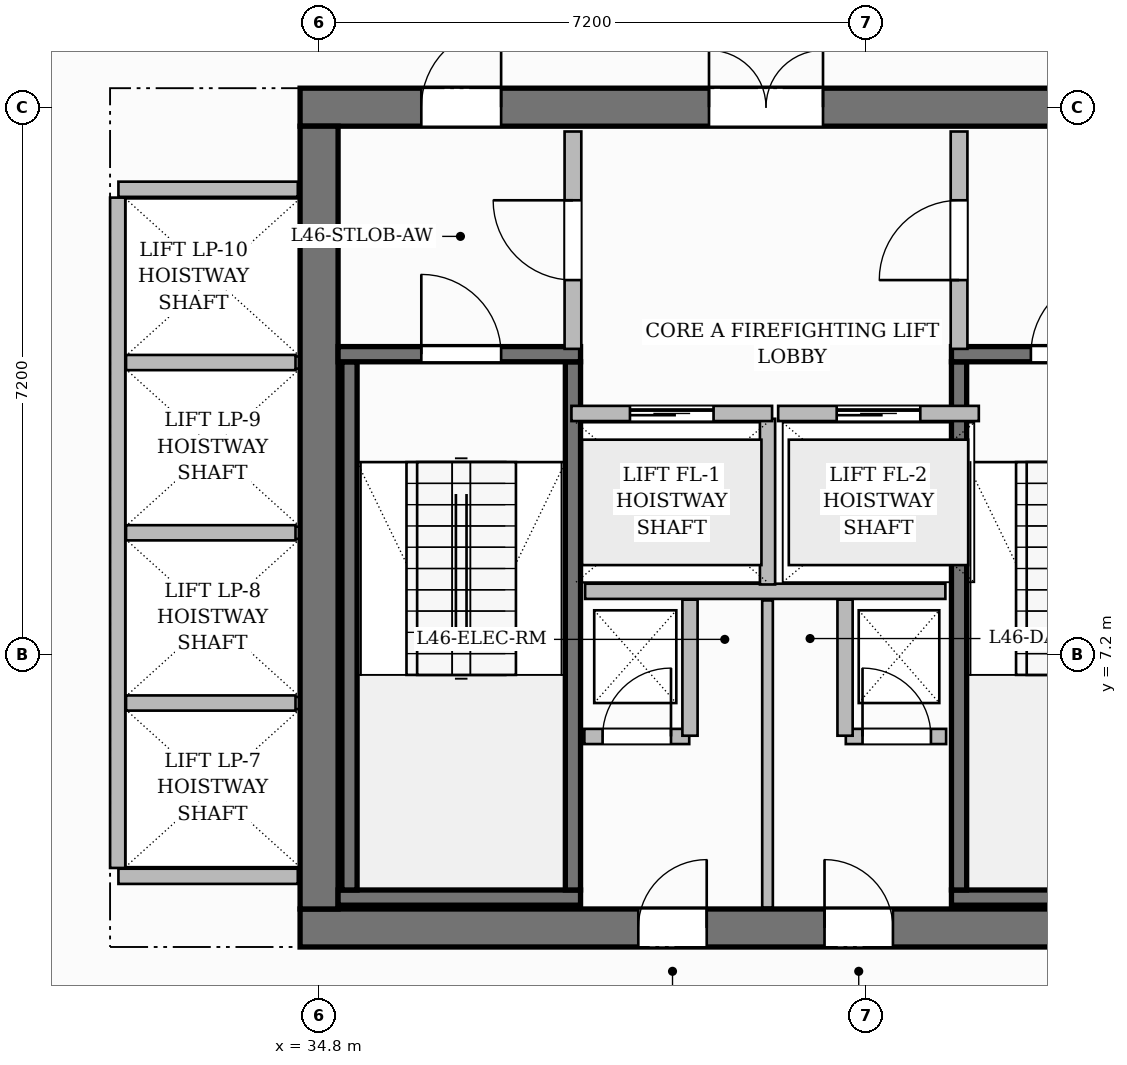
"""IFC4 building model, lengths in metres.
Left out: names, types, materials, properties, quantities, classifications, styles, units other than length and angle.
Written with IfcOpenShell. Run it as: python <this file> out.ifc"""

import sys

from ifc_helpers import new_model, si_unit, direction, frame, frame_2d, origin, place, context, subcontext, project, spatial, rectangle, extrude, source, transform, mapped, element, fill, save


model = new_model("IFC4")
c1 = context("Model", 3, precision=1e-05, world=origin(), true_north=direction((0.0, 1.0)))
c2 = subcontext(c1, "Body", "Model", "MODEL_VIEW")
j1 = project(units=[si_unit("LENGTHUNIT", "METRE"), si_unit("PLANEANGLEUNIT", "RADIAN")], contexts=[c1])
p1 = place(None, origin())
s1 = spatial("IfcSite", under=j1, at=p1, CompositionType="ELEMENT")
p2 = place(p1, origin())
s2 = spatial("IfcBuilding", under=s1, at=p2, CompositionType="ELEMENT")
p3 = place(p2, frame((0.0, 0.0, 184.95)))
s3 = spatial("IfcBuildingStorey", under=s2, at=p3, CompositionType="ELEMENT", Elevation=184.95)
p4 = place(p3, frame((34.55, 3.6, 0.0), z_axis=(0.0, 0.0, 1.0), x_axis=(1.0, 0.0, 0.0)))
e1 = element("IfcWall", 1, at=p4, inside=s3, PredefinedType="SHEAR", context=c2, shape_type="SweptSolid", body=[
    extrude(rectangle(XDim=15.5, YDim=0.5, at=frame_2d((7.75, 0.0))), origin(), (0.0, 0.0, 1.0), 3.85),
])
p5 = place(p4, frame((4.45, 0.0, 0.0)))
e2 = element("IfcOpeningElement", 2, at=p5, cuts=e1, PredefinedType="OPENING", context=c2, shape_type="SweptSolid", body=[
    extrude(rectangle(XDim=0.9, YDim=2.1, at=frame_2d((0.45, 1.05))), frame((0.0, 0.26, 0.0), z_axis=(0.0, -1.0, 0.0), x_axis=(1.0, 0.0, 0.0)), (0.0, 0.0, 1.0), 0.52),
])
p6 = place(p4, frame((6.9, 0.0, 0.0)))
e3 = element("IfcOpeningElement", 3, at=p6, cuts=e1, PredefinedType="OPENING", context=c2, shape_type="SweptSolid", body=[
    extrude(rectangle(XDim=0.9, YDim=2.1, at=frame_2d((0.45, 1.05))), frame((0.0, 0.26, 0.0), z_axis=(0.0, -1.0, 0.0), x_axis=(1.0, 0.0, 0.0)), (0.0, 0.0, 1.0), 0.52),
])
p7 = place(p3, frame((34.55, 14.4, 0.0), z_axis=(0.0, 0.0, 1.0), x_axis=(1.0, 0.0, 0.0)))
e4 = element("IfcWall", 4, at=p7, inside=s3, PredefinedType="SHEAR", context=c2, shape_type="SweptSolid", body=[
    extrude(rectangle(XDim=15.5, YDim=0.5, at=frame_2d((7.75, 0.0))), origin(), (0.0, 0.0, 1.0), 3.85),
])
p8 = place(p7, frame((5.38, 0.0, 0.0)))
e5 = element("IfcOpeningElement", 5, at=p8, cuts=e4, PredefinedType="OPENING", context=c2, shape_type="SweptSolid", body=[
    extrude(rectangle(XDim=1.5, YDim=2.2, at=frame_2d((0.75, 1.1))), frame((0.0, 0.26, 0.0), z_axis=(0.0, -1.0, 0.0), x_axis=(1.0, 0.0, 0.0)), (0.0, 0.0, 1.0), 0.52),
])
p9 = place(p7, frame((1.595, 0.0, 0.0)))
e6 = element("IfcOpeningElement", 6, at=p9, cuts=e4, PredefinedType="OPENING", context=c2, shape_type="SweptSolid", body=[
    extrude(rectangle(XDim=1.05, YDim=2.15, at=frame_2d((0.525, 1.075))), frame((0.0, 0.26, 0.0), z_axis=(0.0, -1.0, 0.0), x_axis=(1.0, 0.0, 0.0)), (0.0, 0.0, 1.0), 0.52),
])
p10 = place(p7, frame((11.225, 0.0, 0.0)))
e7 = element("IfcOpeningElement", 7, at=p10, cuts=e4, PredefinedType="OPENING", context=c2, shape_type="SweptSolid", body=[
    extrude(rectangle(XDim=1.05, YDim=2.15, at=frame_2d((0.525, 1.075))), frame((0.0, 0.26, 0.0), z_axis=(0.0, -1.0, 0.0), x_axis=(1.0, 0.0, 0.0)), (0.0, 0.0, 1.0), 0.52),
])
p11 = place(p3, frame((34.8, 3.85, 0.0), z_axis=(0.0, 0.0, 1.0), x_axis=(0.0, 1.0, 0.0)))
e8 = element("IfcWall", 8, at=p11, inside=s3, PredefinedType="SHEAR", context=c2, shape_type="SweptSolid", body=[
    extrude(rectangle(XDim=10.3, YDim=0.5, at=frame_2d((5.15, 0.0))), origin(), (0.0, 0.0, 1.0), 3.85),
])
p12 = place(p3, frame((35.05, 4.0, 0.0), z_axis=(0.0, 0.0, 1.0), x_axis=(1.0, 0.0, 0.0)))
e9 = element("IfcWall", 9, at=p12, inside=s3, PredefinedType="SHEAR", context=c2, shape_type="SweptSolid", body=[
    extrude(rectangle(XDim=3.19, YDim=0.2, at=frame_2d((1.595, 0.0))), origin(), (0.0, 0.0, 1.0), 3.85),
])
for number, where, z_axis, x_axis in (
    (10, (35.2, 4.1, 0.0), (0.0, 0.0, 1.0), (0.0, 1.0, 0.0)),
    (11, (38.14, 4.1, 0.0), (0.0, 0.0, 1.0), (0.0, 1.0, 0.0)),
):
    element("IfcWall", number, at=place(p3, frame(where, z_axis=z_axis, x_axis=x_axis)), inside=s3, PredefinedType="SHEAR", context=c2, shape_type="SweptSolid", body=[
        extrude(rectangle(XDim=6.95, YDim=0.2, at=frame_2d((3.475, 0.0))), origin(), (0.0, 0.0, 1.0), 3.85),
    ])
p13 = place(p3, frame((35.05, 11.15, 0.0), z_axis=(0.0, 0.0, 1.0), x_axis=(1.0, 0.0, 0.0)))
e12 = element("IfcWall", 12, at=p13, inside=s3, PredefinedType="SHEAR", context=c2, shape_type="SweptSolid", body=[
    extrude(rectangle(XDim=3.19, YDim=0.2, at=frame_2d((1.595, 0.0))), origin(), (0.0, 0.0, 1.0), 3.85),
])
p14 = place(p13, frame((1.095, 0.0, 0.0)))
e13 = element("IfcOpeningElement", 13, at=p14, cuts=e12, PredefinedType="OPENING", context=c2, shape_type="SweptSolid", body=[
    extrude(rectangle(XDim=1.05, YDim=2.2, at=frame_2d((0.525, 1.1))), frame((0.0, 0.11, 0.0), z_axis=(0.0, -1.0, 0.0), x_axis=(1.0, 0.0, 0.0)), (0.0, 0.0, 1.0), 0.22),
])
p15 = place(p3, frame((43.12, 4.0, 0.0), z_axis=(0.0, 0.0, 1.0), x_axis=(1.0, 0.0, 0.0)))
e14 = element("IfcWall", 14, at=p15, inside=s3, PredefinedType="SHEAR", context=c2, shape_type="SweptSolid", body=[
    extrude(rectangle(XDim=6.43, YDim=0.2, at=frame_2d((3.215, 0.0))), origin(), (0.0, 0.0, 1.0), 3.85),
])
p16 = place(p3, frame((43.22, 4.1, 0.0), z_axis=(0.0, 0.0, 1.0), x_axis=(0.0, 1.0, 0.0)))
e15 = element("IfcWall", 15, at=p16, inside=s3, PredefinedType="SHEAR", context=c2, shape_type="SweptSolid", body=[
    extrude(rectangle(XDim=6.95, YDim=0.2, at=frame_2d((3.475, 0.0))), origin(), (0.0, 0.0, 1.0), 3.85),
])
p17 = place(p3, frame((43.12, 11.15, 0.0), z_axis=(0.0, 0.0, 1.0), x_axis=(1.0, 0.0, 0.0)))
e16 = element("IfcWall", 16, at=p17, inside=s3, PredefinedType="SHEAR", context=c2, shape_type="SweptSolid", body=[
    extrude(rectangle(XDim=6.43, YDim=0.2, at=frame_2d((3.215, 0.0))), origin(), (0.0, 0.0, 1.0), 3.85),
])
p18 = place(p17, frame((1.045, 0.0, 0.0)))
e17 = element("IfcOpeningElement", 17, at=p18, cuts=e16, PredefinedType="OPENING", context=c2, shape_type="SweptSolid", body=[
    extrude(rectangle(XDim=1.05, YDim=2.2, at=frame_2d((0.525, 1.1))), frame((0.0, 0.11, 0.0), z_axis=(0.0, -1.0, 0.0), x_axis=(1.0, 0.0, 0.0)), (0.0, 0.0, 1.0), 0.22),
])
p19 = place(p17, frame((4.125, 0.0, 0.0)))
e18 = element("IfcOpeningElement", 18, at=p19, cuts=e16, PredefinedType="OPENING", context=c2, shape_type="SweptSolid", body=[
    extrude(rectangle(XDim=1.05, YDim=2.2, at=frame_2d((0.525, 1.1))), frame((0.0, 0.11, 0.0), z_axis=(0.0, -1.0, 0.0), x_axis=(1.0, 0.0, 0.0)), (0.0, 0.0, 1.0), 0.22),
])
p20 = place(p3, frame((38.3, 8.03, 0.0), z_axis=(0.0, 0.0, 1.0), x_axis=(1.0, 0.0, 0.0)))
e19 = element("IfcWall", 19, at=p20, inside=s3, PredefinedType="PARTITIONING", context=c2, shape_type="SweptSolid", body=[
    extrude(rectangle(XDim=4.74, YDim=0.2, at=frame_2d((2.37, 0.0))), origin(), (0.0, 0.0, 1.0), 3.6),
])
p21 = place(p3, frame((40.7, 8.12, 0.0), z_axis=(0.0, 0.0, 1.0), x_axis=(0.0, 1.0, 0.0)))
e20 = element("IfcWall", 20, at=p21, inside=s3, PredefinedType="PARTITIONING", context=c2, shape_type="SweptSolid", body=[
    extrude(rectangle(XDim=2.18, YDim=0.2, at=frame_2d((1.09, 0.0))), origin(), (0.0, 0.0, 1.0), 3.6),
])
p22 = place(p3, frame((38.14, 11.22, 0.0), z_axis=(0.0, 0.0, 1.0), x_axis=(0.0, 1.0, 0.0)))
e21 = element("IfcWall", 21, at=p22, inside=s3, PredefinedType="PARTITIONING", context=c2, shape_type="SweptSolid", body=[
    extrude(rectangle(XDim=2.86, YDim=0.22, at=frame_2d((1.43, 0.0))), origin(), (0.0, 0.0, 1.0), 3.6),
])
p23 = place(p22, frame((0.905, 0.0, 0.0)))
e22 = element("IfcOpeningElement", 22, at=p23, cuts=e21, PredefinedType="OPENING", context=c2, shape_type="SweptSolid", body=[
    extrude(rectangle(XDim=1.05, YDim=2.15, at=frame_2d((0.525, 1.075))), frame((0.0, 0.12, 0.0), z_axis=(0.0, -1.0, 0.0), x_axis=(1.0, 0.0, 0.0)), (0.0, 0.0, 1.0), 0.24),
])
p24 = place(p3, frame((43.22, 11.22, 0.0), z_axis=(0.0, 0.0, 1.0), x_axis=(0.0, 1.0, 0.0)))
e23 = element("IfcWall", 23, at=p24, inside=s3, PredefinedType="PARTITIONING", context=c2, shape_type="SweptSolid", body=[
    extrude(rectangle(XDim=2.86, YDim=0.22, at=frame_2d((1.43, 0.0))), origin(), (0.0, 0.0, 1.0), 3.6),
])
p25 = place(p24, frame((0.905, 0.0, 0.0)))
e24 = element("IfcOpeningElement", 24, at=p25, cuts=e23, PredefinedType="OPENING", context=c2, shape_type="SweptSolid", body=[
    extrude(rectangle(XDim=1.05, YDim=2.15, at=frame_2d((0.525, 1.075))), frame((0.0, 0.12, 0.0), z_axis=(0.0, -1.0, 0.0), x_axis=(1.0, 0.0, 0.0)), (0.0, 0.0, 1.0), 0.24),
])
p26 = place(p3, frame((38.29, 6.12, 0.0), z_axis=(0.0, 0.0, 1.0), x_axis=(1.0, 0.0, 0.0)))
e25 = element("IfcWall", 25, at=p26, inside=s3, PredefinedType="PARTITIONING", context=c2, shape_type="SweptSolid", body=[
    extrude(rectangle(XDim=1.38, YDim=0.2, at=frame_2d((0.69, 0.0))), origin(), (0.0, 0.0, 1.0), 3.6),
])
p27 = place(p26, frame((0.24, 0.0, 0.0)))
e26 = element("IfcOpeningElement", 26, at=p27, cuts=e25, PredefinedType="OPENING", context=c2, shape_type="SweptSolid", body=[
    extrude(rectangle(XDim=0.9, YDim=2.1, at=frame_2d((0.45, 1.05))), frame((0.0, 0.11, 0.0), z_axis=(0.0, -1.0, 0.0), x_axis=(1.0, 0.0, 0.0)), (0.0, 0.0, 1.0), 0.22),
])
p28 = place(p3, frame((39.68, 6.13, 0.0), z_axis=(0.0, 0.0, 1.0), x_axis=(0.0, 1.0, 0.0)))
e27 = element("IfcWall", 27, at=p28, inside=s3, PredefinedType="PARTITIONING", context=c2, shape_type="SweptSolid", body=[
    extrude(rectangle(XDim=1.79, YDim=0.2, at=frame_2d((0.895, 0.0))), origin(), (0.0, 0.0, 1.0), 3.6),
])
p29 = place(p3, frame((41.73, 6.12, 0.0), z_axis=(0.0, 0.0, 1.0), x_axis=(1.0, 0.0, 0.0)))
e28 = element("IfcWall", 28, at=p29, inside=s3, PredefinedType="PARTITIONING", context=c2, shape_type="SweptSolid", body=[
    extrude(rectangle(XDim=1.32, YDim=0.2, at=frame_2d((0.66, 0.0))), origin(), (0.0, 0.0, 1.0), 3.6),
])
p30 = place(p29, frame((0.22, 0.0, 0.0)))
e29 = element("IfcOpeningElement", 29, at=p30, cuts=e28, PredefinedType="OPENING", context=c2, shape_type="SweptSolid", body=[
    extrude(rectangle(XDim=0.9, YDim=2.1, at=frame_2d((0.45, 1.05))), frame((0.0, 0.11, 0.0), z_axis=(0.0, -1.0, 0.0), x_axis=(1.0, 0.0, 0.0)), (0.0, 0.0, 1.0), 0.22),
])
p31 = place(p3, frame((41.72, 6.13, 0.0), z_axis=(0.0, 0.0, 1.0), x_axis=(0.0, 1.0, 0.0)))
e30 = element("IfcWall", 30, at=p31, inside=s3, PredefinedType="PARTITIONING", context=c2, shape_type="SweptSolid", body=[
    extrude(rectangle(XDim=1.79, YDim=0.2, at=frame_2d((0.895, 0.0))), origin(), (0.0, 0.0, 1.0), 3.6),
])
p32 = place(p3, frame((40.7, 3.87, 0.0), z_axis=(0.0, 0.0, 1.0), x_axis=(0.0, 1.0, 0.0)))
e31 = element("IfcWall", 31, at=p32, inside=s3, PredefinedType="PARTITIONING", context=c2, shape_type="SweptSolid", body=[
    extrude(rectangle(XDim=4.04, YDim=0.14, at=frame_2d((2.02, 0.0))), origin(), (0.0, 0.0, 1.0), 3.6),
])
for number, where, z_axis, x_axis in (
    (32, (32.16, 4.28, 0.0), (0.0, 0.0, 1.0), (1.0, 0.0, 0.0)),
    (33, (32.16, 13.32, 0.0), (0.0, 0.0, 1.0), (1.0, 0.0, 0.0)),
):
    element("IfcWall", number, at=place(p3, frame(where, z_axis=z_axis, x_axis=x_axis)), inside=s3, PredefinedType="PARTITIONING", context=c2, shape_type="SweptSolid", body=[
        extrude(rectangle(XDim=2.36, YDim=0.2, at=frame_2d((1.18, 0.0))), origin(), (0.0, 0.0, 1.0), 3.6),
    ])
p33 = place(p3, frame((32.15, 4.39, 0.0), z_axis=(0.0, 0.0, 1.0), x_axis=(0.0, 1.0, 0.0)))
e34 = element("IfcWall", 34, at=p33, inside=s3, PredefinedType="PARTITIONING", context=c2, shape_type="SweptSolid", body=[
    extrude(rectangle(XDim=8.82, YDim=0.2, at=frame_2d((4.41, 0.0))), origin(), (0.0, 0.0, 1.0), 3.6),
])
for number, where, z_axis, x_axis in (
    (35, (32.26, 6.56, 0.0), (0.0, 0.0, 1.0), (1.0, 0.0, 0.0)),
    (36, (32.26, 8.8, 0.0), (0.0, 0.0, 1.0), (1.0, 0.0, 0.0)),
    (37, (32.26, 11.04, 0.0), (0.0, 0.0, 1.0), (1.0, 0.0, 0.0)),
):
    element("IfcWall", number, at=place(p3, frame(where, z_axis=z_axis, x_axis=x_axis)), inside=s3, PredefinedType="PARTITIONING", context=c2, shape_type="SweptSolid", body=[
        extrude(rectangle(XDim=2.23, YDim=0.2, at=frame_2d((1.115, 0.0))), origin(), (0.0, 0.0, 1.0), 3.6),
    ])
p34 = place(p3, frame((38.12, 10.37, 0.0), z_axis=(0.0, 0.0, 1.0), x_axis=(1.0, 0.0, 0.0)))
e38 = element("IfcWall", 38, at=p34, inside=s3, PredefinedType="PARTITIONING", context=c2, shape_type="SweptSolid", body=[
    extrude(rectangle(XDim=2.64, YDim=0.2, at=frame_2d((1.32, 0.0))), origin(), (0.0, 0.0, 1.0), 3.6),
])
p35 = place(p34, frame((0.77, 0.0, 0.0)))
e39 = element("IfcOpeningElement", 39, at=p35, cuts=e38, PredefinedType="OPENING", context=c2, shape_type="SweptSolid", body=[
    extrude(rectangle(XDim=1.1, YDim=2.2, at=frame_2d((0.55, 1.1))), frame((0.0, 0.11, 0.0), z_axis=(0.0, -1.0, 0.0), x_axis=(1.0, 0.0, 0.0)), (0.0, 0.0, 1.0), 0.22),
])
p36 = place(p3, frame((40.84, 10.37, 0.0), z_axis=(0.0, 0.0, 1.0), x_axis=(1.0, 0.0, 0.0)))
e40 = element("IfcWall", 40, at=p36, inside=s3, PredefinedType="PARTITIONING", context=c2, shape_type="SweptSolid", body=[
    extrude(rectangle(XDim=2.64, YDim=0.2, at=frame_2d((1.32, 0.0))), origin(), (0.0, 0.0, 1.0), 3.6),
])
p37 = place(p36, frame((0.77, 0.0, 0.0)))
e41 = element("IfcOpeningElement", 41, at=p37, cuts=e40, PredefinedType="OPENING", context=c2, shape_type="SweptSolid", body=[
    extrude(rectangle(XDim=1.1, YDim=2.2, at=frame_2d((0.55, 1.1))), frame((0.0, 0.11, 0.0), z_axis=(0.0, -1.0, 0.0), x_axis=(1.0, 0.0, 0.0)), (0.0, 0.0, 1.0), 0.22),
])
m1 = source(origin(), c2, "Body", "SweptSolid", [
    extrude(rectangle(XDim=1.05, YDim=2.2, at=frame_2d((0.525, 1.1))), frame((0.0, 0.025, 0.0), z_axis=(0.0, -1.0, 0.0), x_axis=(1.0, 0.0, 0.0)), (0.0, 0.0, 1.0), 0.05),
])
p38 = place(p14, origin())
e42 = element("IfcDoor", 42, at=p38, inside=s3, OperationType="SINGLE_SWING_LEFT", PredefinedType="DOOR", context=c2, shape_type="MappedRepresentation", body=[
    mapped(m1, transform((0.0, 0.0, 0.0), scale=1.0)),
])
fill(e13, e42)
p39 = place(p18, origin())
e43 = element("IfcDoor", 43, at=p39, inside=s3, OperationType="SINGLE_SWING_RIGHT", PredefinedType="DOOR", context=c2, shape_type="MappedRepresentation", body=[
    mapped(m1, transform((0.0, 0.0, 0.0), scale=1.0)),
])
fill(e17, e43)
m2 = source(origin(), c2, "Body", "SweptSolid", [
    extrude(rectangle(XDim=1.05, YDim=2.15, at=frame_2d((0.525, 1.075))), frame((0.0, 0.025, 0.0), z_axis=(0.0, -1.0, 0.0), x_axis=(1.0, 0.0, 0.0)), (0.0, 0.0, 1.0), 0.05),
])
p40 = place(p23, origin())
e44 = element("IfcDoor", 44, at=p40, inside=s3, OperationType="SINGLE_SWING_RIGHT", PredefinedType="DOOR", context=c2, shape_type="MappedRepresentation", body=[
    mapped(m2, transform((0.0, 0.0, 0.0), scale=1.0)),
])
fill(e22, e44)
p41 = place(p25, origin())
e45 = element("IfcDoor", 45, at=p41, inside=s3, OperationType="SINGLE_SWING_LEFT", PredefinedType="DOOR", context=c2, shape_type="MappedRepresentation", body=[
    mapped(m2, transform((0.0, 0.0, 0.0), scale=1.0)),
])
fill(e24, e45)
m3 = source(origin(), c2, "Body", "SweptSolid", [
    extrude(rectangle(XDim=1.5, YDim=2.2, at=frame_2d((0.75, 1.1))), frame((0.0, 0.025, 0.0), z_axis=(0.0, -1.0, 0.0), x_axis=(1.0, 0.0, 0.0)), (0.0, 0.0, 1.0), 0.05),
])
p42 = place(p8, origin())
e46 = element("IfcDoor", 46, at=p42, inside=s3, OperationType="DOUBLE_DOOR_SINGLE_SWING", PredefinedType="DOOR", context=c2, shape_type="MappedRepresentation", body=[
    mapped(m3, transform((0.0, 0.0, 0.0), scale=1.0)),
])
fill(e5, e46)
p43 = place(p9, origin())
e47 = element("IfcDoor", 47, at=p43, inside=s3, OperationType="SINGLE_SWING_RIGHT", PredefinedType="DOOR", context=c2, shape_type="MappedRepresentation", body=[
    mapped(m2, transform((0.0, 0.0, 0.0), scale=1.0)),
])
fill(e6, e47)
m4 = source(origin(), c2, "Body", "SweptSolid", [
    extrude(rectangle(XDim=0.9, YDim=2.1, at=frame_2d((0.45, 1.05))), frame((0.0, 0.025, 0.0), z_axis=(0.0, -1.0, 0.0), x_axis=(1.0, 0.0, 0.0)), (0.0, 0.0, 1.0), 0.05),
])
p44 = place(p27, origin())
e48 = element("IfcDoor", 48, at=p44, inside=s3, OperationType="SINGLE_SWING_RIGHT", PredefinedType="DOOR", context=c2, shape_type="MappedRepresentation", body=[
    mapped(m4, transform((0.0, 0.0, 0.0), scale=1.0)),
])
fill(e26, e48)
p45 = place(p30, origin())
e49 = element("IfcDoor", 49, at=p45, inside=s3, OperationType="SINGLE_SWING_LEFT", PredefinedType="DOOR", context=c2, shape_type="MappedRepresentation", body=[
    mapped(m4, transform((0.0, 0.0, 0.0), scale=1.0)),
])
fill(e29, e49)
p46 = place(p5, origin())
e50 = element("IfcDoor", 50, at=p46, inside=s3, OperationType="SINGLE_SWING_RIGHT", PredefinedType="DOOR", context=c2, shape_type="MappedRepresentation", body=[
    mapped(m4, transform((0.0, 0.0, 0.0), scale=1.0)),
])
fill(e2, e50)
p47 = place(p6, origin())
e51 = element("IfcDoor", 51, at=p47, inside=s3, OperationType="SINGLE_SWING_LEFT", PredefinedType="DOOR", context=c2, shape_type="MappedRepresentation", body=[
    mapped(m4, transform((0.0, 0.0, 0.0), scale=1.0)),
])
fill(e3, e51)
m5 = source(origin(), c2, "Body", "SweptSolid", [
    extrude(rectangle(XDim=1.1, YDim=2.2, at=frame_2d((0.55, 1.1))), frame((0.0, 0.025, 0.0), z_axis=(0.0, -1.0, 0.0), x_axis=(1.0, 0.0, 0.0)), (0.0, 0.0, 1.0), 0.05),
])
p48 = place(p35, origin())
e52 = element("IfcDoor", 52, at=p48, inside=s3, OperationType="SLIDING_TO_LEFT", PredefinedType="DOOR", context=c2, shape_type="MappedRepresentation", body=[
    mapped(m5, transform((0.0, 0.0, 0.0), scale=1.0)),
])
fill(e39, e52)
p49 = place(p37, origin())
e53 = element("IfcDoor", 53, at=p49, inside=s3, OperationType="SLIDING_TO_LEFT", PredefinedType="DOOR", context=c2, shape_type="MappedRepresentation", body=[
    mapped(m5, transform((0.0, 0.0, 0.0), scale=1.0)),
])
fill(e41, e53)
save(model, sys.argv[1])
